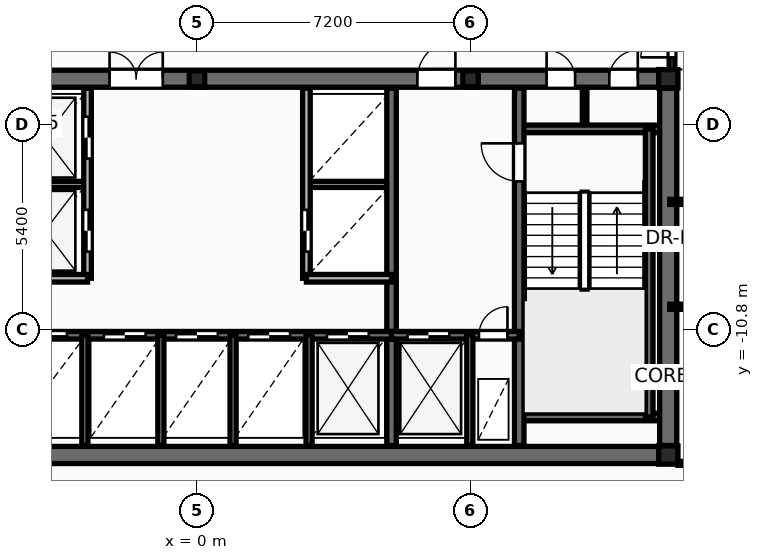
"""IFC4 building model, lengths in metres.
Left out: names, types, materials, properties, quantities, classifications, styles, units other than length and angle.
Written with IfcOpenShell. Run it as: python <this file> out.ifc"""

import sys

from ifc_helpers import new_model, si_unit, direction, frame, frame_2d, origin, origin_2d, place, context, subcontext, project, spatial, rectangle, i_section, extrude, element, fill, save


model = new_model("IFC4")
c1 = context("Model", 3, precision=1e-05, world=origin(), true_north=direction((0.0, 1.0)))
c2 = subcontext(c1, "Body", "Model", "MODEL_VIEW")
j1 = project(units=[si_unit("LENGTHUNIT", "METRE"), si_unit("PLANEANGLEUNIT", "RADIAN")], contexts=[c1])
p1 = place(None, origin())
s1 = spatial("IfcSite", under=j1, at=p1, CompositionType="ELEMENT")
p2 = place(p1, origin())
s2 = spatial("IfcBuilding", under=s1, at=p2, CompositionType="ELEMENT")
p3 = place(p2, frame((0.0, 0.0, 53.1)))
s3 = spatial("IfcBuildingStorey", under=s2, at=p3, CompositionType="ELEMENT", Elevation=53.1)
for number, where, z_axis, x_axis in (
    (1, (12.4, -14.1, 0.0), (0.0, 0.0, 1.0), (1.0, 0.0, 0.0)),
    (2, (12.4, -4.2, 0.0), (0.0, 0.0, 1.0), (1.0, 0.0, 0.0)),
):
    element("IfcColumn", number, at=place(p3, frame(where, z_axis=z_axis, x_axis=x_axis)), inside=s3, PredefinedType="COLUMN", context=c2, shape_type="SweptSolid", body=[
        extrude(i_section(OverallWidth=0.5, OverallDepth=0.482, WebThickness=0.04, FlangeThickness=0.045, at=origin_2d()), origin(), (0.0, 0.0, 1.0), 3.6),
    ])
for number, where, z_axis, x_axis in (
    (3, (0.0, -4.2, 0.0), (0.0, 0.0, 1.0), (1.0, 0.0, 0.0)),
    (4, (7.2, -4.2, 0.0), (0.0, 0.0, 1.0), (1.0, 0.0, 0.0)),
):
    element("IfcColumn", number, at=place(p3, frame(where, z_axis=z_axis, x_axis=x_axis)), inside=s3, PredefinedType="PILASTER", context=c2, shape_type="SweptSolid", body=[
        extrude(i_section(OverallWidth=0.405, OverallDepth=0.414, WebThickness=0.022, FlangeThickness=0.032, at=origin_2d()), origin(), (0.0, 0.0, 1.0), 3.6),
    ])
for number, where, z_axis, x_axis in (
    (5, (-5.12, -6.98, 0.0), (0.0, 0.0, 1.0), (1.0, 0.0, 0.0)),
    (6, (2.88, -6.98, 0.0), (0.0, 0.0, 1.0), (1.0, 0.0, 0.0)),
):
    element("IfcWall", number, at=place(p3, frame(where, z_axis=z_axis, x_axis=x_axis)), inside=s3, PredefinedType="PARTITIONING", context=c2, shape_type="SweptSolid", body=[
        extrude(rectangle(XDim=2.24, YDim=0.16, at=frame_2d((1.12, 0.0))), origin(), (0.0, 0.0, 1.0), 3.35),
    ])
p4 = place(p3, frame((10.2, -5.52, 0.0), z_axis=(0.0, 0.0, 1.0), x_axis=(0.0, 1.0, 0.0)))
e7 = element("IfcWall", 7, at=p4, inside=s3, PredefinedType="PARTITIONING", context=c2, shape_type="SweptSolid", body=[
    extrude(rectangle(XDim=1.12, YDim=0.12, at=frame_2d((0.56, 0.0))), origin(), (0.0, 0.0, 1.0), 3.35),
])
p5 = place(p3, frame((-12.65, -14.1, 0.0), z_axis=(0.0, 0.0, 1.0), x_axis=(1.0, 0.0, 0.0)))
e8 = element("IfcWall", 8, at=p5, inside=s3, PredefinedType="SHEAR", context=c2, shape_type="SweptSolid", body=[
    extrude(rectangle(XDim=25.3, YDim=0.45, at=frame_2d((12.65, 0.0))), origin(), (0.0, 0.0, 1.0), 3.6),
])
p6 = place(p3, frame((-12.65, -4.2, 0.0), z_axis=(0.0, 0.0, 1.0), x_axis=(1.0, 0.0, 0.0)))
e9 = element("IfcWall", 9, at=p6, inside=s3, PredefinedType="SHEAR", context=c2, shape_type="SweptSolid", body=[
    extrude(rectangle(XDim=25.3, YDim=0.45, at=frame_2d((12.65, 0.0))), origin(), (0.0, 0.0, 1.0), 3.6),
])
p7 = place(p6, frame((1.85, 0.0, 0.0)))
e10 = element("IfcOpeningElement", 10, at=p7, cuts=e9, PredefinedType="OPENING", context=c2, shape_type="SweptSolid", body=[
    extrude(rectangle(XDim=0.756, YDim=2.054, at=frame_2d((0.375, 1.027))), frame((0.0, 0.235, 0.0), z_axis=(0.0, -1.0, 0.0), x_axis=(1.0, 0.0, 0.0)), (0.0, 0.0, 1.0), 0.47),
])
p8 = place(p6, frame((21.85, 0.0, 0.0)))
e11 = element("IfcOpeningElement", 11, at=p8, cuts=e9, PredefinedType="OPENING", context=c2, shape_type="SweptSolid", body=[
    extrude(rectangle(XDim=0.756, YDim=2.054, at=frame_2d((0.375, 1.027))), frame((0.0, 0.235, 0.0), z_axis=(0.0, -1.0, 0.0), x_axis=(1.0, 0.0, 0.0)), (0.0, 0.0, 1.0), 0.47),
])
p9 = place(p6, frame((23.5, 0.0, 0.0)))
e12 = element("IfcOpeningElement", 12, at=p9, cuts=e9, PredefinedType="OPENING", context=c2, shape_type="SweptSolid", body=[
    extrude(rectangle(XDim=0.756, YDim=2.054, at=frame_2d((0.375, 1.027))), frame((0.0, 0.235, 0.0), z_axis=(0.0, -1.0, 0.0), x_axis=(1.0, 0.0, 0.0)), (0.0, 0.0, 1.0), 0.47),
])
p10 = place(p6, frame((5.85, 0.0, 0.0)))
e13 = element("IfcOpeningElement", 13, at=p10, cuts=e9, PredefinedType="OPENING", context=c2, shape_type="SweptSolid", body=[
    extrude(rectangle(XDim=1.006, YDim=2.104, at=frame_2d((0.5, 1.052))), frame((0.0, 0.235, 0.0), z_axis=(0.0, -1.0, 0.0), x_axis=(1.0, 0.0, 0.0)), (0.0, 0.0, 1.0), 0.47),
])
p11 = place(p6, frame((10.35, 0.0, 0.0)))
e14 = element("IfcOpeningElement", 14, at=p11, cuts=e9, PredefinedType="OPENING", context=c2, shape_type="SweptSolid", body=[
    extrude(rectangle(XDim=1.406, YDim=2.154, at=frame_2d((0.7, 1.077))), frame((0.0, 0.235, 0.0), z_axis=(0.0, -1.0, 0.0), x_axis=(1.0, 0.0, 0.0)), (0.0, 0.0, 1.0), 0.47),
])
p12 = place(p6, frame((18.45, 0.0, 0.0)))
e15 = element("IfcOpeningElement", 15, at=p12, cuts=e9, PredefinedType="OPENING", context=c2, shape_type="SweptSolid", body=[
    extrude(rectangle(XDim=1.006, YDim=2.104, at=frame_2d((0.5, 1.052))), frame((0.0, 0.235, 0.0), z_axis=(0.0, -1.0, 0.0), x_axis=(1.0, 0.0, 0.0)), (0.0, 0.0, 1.0), 0.47),
])
for number, where, z_axis, x_axis in (
    (16, (8.48, -5.52, 0.0), (0.0, 0.0, 1.0), (1.0, 0.0, 0.0)),
    (17, (8.48, -13.1, 0.0), (0.0, 0.0, 1.0), (1.0, 0.0, 0.0)),
):
    element("IfcWall", number, at=place(p3, frame(where, z_axis=z_axis, x_axis=x_axis)), inside=s3, PredefinedType="SOLIDWALL", context=c2, shape_type="SweptSolid", body=[
        extrude(rectangle(XDim=3.87, YDim=0.2, at=frame_2d((1.935, 0.0))), origin(), (0.0, 0.0, 1.0), 3.6),
    ])
p13 = place(p3, frame((11.9, -13.1, 0.0), z_axis=(0.0, 0.0, 1.0), x_axis=(0.0, 1.0, 0.0)))
e18 = element("IfcWall", 18, at=p13, inside=s3, PredefinedType="SOLIDWALL", context=c2, shape_type="SweptSolid", body=[
    extrude(rectangle(XDim=7.58, YDim=0.2, at=frame_2d((3.79, 0.0))), origin(), (0.0, 0.0, 1.0), 3.6),
])
p14 = place(p3, frame((8.48, -13.85, 0.0), z_axis=(0.0, 0.0, 1.0), x_axis=(0.0, 1.0, 0.0)))
e19 = element("IfcWall", 19, at=p14, inside=s3, PredefinedType="SHEAR", context=c2, shape_type="SweptSolid", body=[
    extrude(rectangle(XDim=9.4, YDim=0.25, at=frame_2d((4.7, 0.0))), origin(), (0.0, 0.0, 1.0), 3.6),
])
p15 = place(p14, frame((6.95, 0.0, 0.0)))
e20 = element("IfcOpeningElement", 20, at=p15, cuts=e19, PredefinedType="OPENING", context=c2, shape_type="SweptSolid", body=[
    extrude(rectangle(XDim=1.006, YDim=2.104, at=frame_2d((0.5, 1.052))), frame((0.0, 0.135, 0.0), z_axis=(0.0, -1.0, 0.0), x_axis=(1.0, 0.0, 0.0)), (0.0, 0.0, 1.0), 0.27),
])
p16 = place(p3, frame((5.12, -13.85, 0.0), z_axis=(0.0, 0.0, 1.0), x_axis=(0.0, 1.0, 0.0)))
e21 = element("IfcWall", 21, at=p16, inside=s3, PredefinedType="SHEAR", context=c2, shape_type="SweptSolid", body=[
    extrude(rectangle(XDim=9.4, YDim=0.25, at=frame_2d((4.7, 0.0))), origin(), (0.0, 0.0, 1.0), 3.6),
])
p17 = place(p3, frame((-5.12, -10.95, 0.0), z_axis=(0.0, 0.0, 1.0), x_axis=(1.0, 0.0, 0.0)))
e22 = element("IfcWall", 22, at=p17, inside=s3, PredefinedType="SOLIDWALL", context=c2, shape_type="SweptSolid", body=[
    extrude(rectangle(XDim=10.24, YDim=0.2, at=frame_2d((5.12, 0.0))), origin(), (0.0, 0.0, 1.0), 3.6),
])
p18 = place(p17, frame((0.6, 0.0, 0.0)))
e23 = element("IfcOpeningElement", 23, at=p18, cuts=e22, PredefinedType="OPENING", context=c2, shape_type="SweptSolid", body=[
    extrude(rectangle(XDim=1.106, YDim=2.104, at=frame_2d((0.55, 1.052))), frame((0.0, 0.11, 0.0), z_axis=(0.0, -1.0, 0.0), x_axis=(1.0, 0.0, 0.0)), (0.0, 0.0, 1.0), 0.22),
])
p19 = place(p17, frame((2.67, 0.0, 0.0)))
e24 = element("IfcOpeningElement", 24, at=p19, cuts=e22, PredefinedType="OPENING", context=c2, shape_type="SweptSolid", body=[
    extrude(rectangle(XDim=1.106, YDim=2.104, at=frame_2d((0.55, 1.052))), frame((0.0, 0.11, 0.0), z_axis=(0.0, -1.0, 0.0), x_axis=(1.0, 0.0, 0.0)), (0.0, 0.0, 1.0), 0.22),
])
p20 = place(p17, frame((4.57, 0.0, 0.0)))
e25 = element("IfcOpeningElement", 25, at=p20, cuts=e22, PredefinedType="OPENING", context=c2, shape_type="SweptSolid", body=[
    extrude(rectangle(XDim=1.106, YDim=2.104, at=frame_2d((0.55, 1.052))), frame((0.0, 0.11, 0.0), z_axis=(0.0, -1.0, 0.0), x_axis=(1.0, 0.0, 0.0)), (0.0, 0.0, 1.0), 0.22),
])
p21 = place(p17, frame((6.47, 0.0, 0.0)))
e26 = element("IfcOpeningElement", 26, at=p21, cuts=e22, PredefinedType="OPENING", context=c2, shape_type="SweptSolid", body=[
    extrude(rectangle(XDim=1.106, YDim=2.104, at=frame_2d((0.55, 1.052))), frame((0.0, 0.11, 0.0), z_axis=(0.0, -1.0, 0.0), x_axis=(1.0, 0.0, 0.0)), (0.0, 0.0, 1.0), 0.22),
])
p22 = place(p17, frame((8.54, 0.0, 0.0)))
e27 = element("IfcOpeningElement", 27, at=p22, cuts=e22, PredefinedType="OPENING", context=c2, shape_type="SweptSolid", body=[
    extrude(rectangle(XDim=1.106, YDim=2.104, at=frame_2d((0.55, 1.052))), frame((0.0, 0.11, 0.0), z_axis=(0.0, -1.0, 0.0), x_axis=(1.0, 0.0, 0.0)), (0.0, 0.0, 1.0), 0.22),
])
p23 = place(p3, frame((5.12, -10.95, 0.0), z_axis=(0.0, 0.0, 1.0), x_axis=(1.0, 0.0, 0.0)))
e28 = element("IfcWall", 28, at=p23, inside=s3, PredefinedType="SOLIDWALL", context=c2, shape_type="SweptSolid", body=[
    extrude(rectangle(XDim=3.36, YDim=0.2, at=frame_2d((1.68, 0.0))), origin(), (0.0, 0.0, 1.0), 3.6),
])
p24 = place(p23, frame((0.42, 0.0, 0.0)))
e29 = element("IfcOpeningElement", 29, at=p24, cuts=e28, PredefinedType="OPENING", context=c2, shape_type="SweptSolid", body=[
    extrude(rectangle(XDim=1.106, YDim=2.104, at=frame_2d((0.55, 1.052))), frame((0.0, 0.11, 0.0), z_axis=(0.0, -1.0, 0.0), x_axis=(1.0, 0.0, 0.0)), (0.0, 0.0, 1.0), 0.22),
])
p25 = place(p23, frame((2.3, 0.0, 0.0)))
e30 = element("IfcOpeningElement", 30, at=p25, cuts=e28, PredefinedType="OPENING", context=c2, shape_type="SweptSolid", body=[
    extrude(rectangle(XDim=0.756, YDim=2.054, at=frame_2d((0.375, 1.027))), frame((0.0, 0.11, 0.0), z_axis=(0.0, -1.0, 0.0), x_axis=(1.0, 0.0, 0.0)), (0.0, 0.0, 1.0), 0.22),
])
for number, where, z_axis, x_axis in (
    (31, (7.18, -13.85, 0.0), (0.0, 0.0, 1.0), (0.0, 1.0, 0.0)),
    (32, (-2.95, -13.85, 0.0), (0.0, 0.0, 1.0), (0.0, 1.0, 0.0)),
    (33, (2.95, -13.85, 0.0), (0.0, 0.0, 1.0), (0.0, 1.0, 0.0)),
):
    element("IfcWall", number, at=place(p3, frame(where, z_axis=z_axis, x_axis=x_axis)), inside=s3, PredefinedType="PARTITIONING", context=c2, shape_type="SweptSolid", body=[
        extrude(rectangle(XDim=2.9, YDim=0.16, at=frame_2d((1.45, 0.0))), origin(), (0.0, 0.0, 1.0), 2.375),
    ])
p26 = place(p3, frame((12.4, -13.85, 0.0), z_axis=(0.0, 0.0, 1.0), x_axis=(0.0, 1.0, 0.0)))
e34 = element("IfcWall", 34, at=p26, inside=s3, PredefinedType="SHEAR", context=c2, shape_type="SweptSolid", body=[
    extrude(rectangle(XDim=9.4, YDim=0.45, at=frame_2d((4.7, 0.0))), origin(), (0.0, 0.0, 1.0), 3.6),
])
p27 = place(p3, frame((-2.88, -9.45, 0.0), z_axis=(0.0, 0.0, 1.0), x_axis=(0.0, 1.0, 0.0)))
e35 = element("IfcWall", 35, at=p27, inside=s3, PredefinedType="SOLIDWALL", context=c2, shape_type="SweptSolid", body=[
    extrude(rectangle(XDim=5.0, YDim=0.2, at=frame_2d((2.5, 0.0))), origin(), (0.0, 0.0, 1.0), 3.35),
])
p28 = place(p27, frame((0.7, 0.0, 0.0)))
e36 = element("IfcOpeningElement", 36, at=p28, cuts=e35, PredefinedType="OPENING", context=c2, shape_type="SweptSolid", body=[
    extrude(rectangle(XDim=1.106, YDim=2.104, at=frame_2d((0.55, 1.052))), frame((0.0, 0.11, 0.0), z_axis=(0.0, -1.0, 0.0), x_axis=(1.0, 0.0, 0.0)), (0.0, 0.0, 1.0), 0.22),
])
p29 = place(p27, frame((3.15, 0.0, 0.0)))
e37 = element("IfcOpeningElement", 37, at=p29, cuts=e35, PredefinedType="OPENING", context=c2, shape_type="SweptSolid", body=[
    extrude(rectangle(XDim=1.106, YDim=2.104, at=frame_2d((0.55, 1.052))), frame((0.0, 0.11, 0.0), z_axis=(0.0, -1.0, 0.0), x_axis=(1.0, 0.0, 0.0)), (0.0, 0.0, 1.0), 0.22),
])
p30 = place(p3, frame((-5.12, -9.45, 0.0), z_axis=(0.0, 0.0, 1.0), x_axis=(1.0, 0.0, 0.0)))
e38 = element("IfcWall", 38, at=p30, inside=s3, PredefinedType="SOLIDWALL", context=c2, shape_type="SweptSolid", body=[
    extrude(rectangle(XDim=2.24, YDim=0.2, at=frame_2d((1.12, 0.0))), origin(), (0.0, 0.0, 1.0), 3.35),
])
p31 = place(p3, frame((2.88, -9.45, 0.0), z_axis=(0.0, 0.0, 1.0), x_axis=(0.0, 1.0, 0.0)))
e39 = element("IfcWall", 39, at=p31, inside=s3, PredefinedType="SOLIDWALL", context=c2, shape_type="SweptSolid", body=[
    extrude(rectangle(XDim=5.0, YDim=0.2, at=frame_2d((2.5, 0.0))), origin(), (0.0, 0.0, 1.0), 3.35),
])
p32 = place(p31, frame((0.7, 0.0, 0.0)))
e40 = element("IfcOpeningElement", 40, at=p32, cuts=e39, PredefinedType="OPENING", context=c2, shape_type="SweptSolid", body=[
    extrude(rectangle(XDim=1.106, YDim=2.104, at=frame_2d((0.55, 1.052))), frame((0.0, 0.11, 0.0), z_axis=(0.0, -1.0, 0.0), x_axis=(1.0, 0.0, 0.0)), (0.0, 0.0, 1.0), 0.22),
])
p33 = place(p3, frame((2.88, -9.45, 0.0), z_axis=(0.0, 0.0, 1.0), x_axis=(1.0, 0.0, 0.0)))
e41 = element("IfcWall", 41, at=p33, inside=s3, PredefinedType="SOLIDWALL", context=c2, shape_type="SweptSolid", body=[
    extrude(rectangle(XDim=2.24, YDim=0.2, at=frame_2d((1.12, 0.0))), origin(), (0.0, 0.0, 1.0), 3.35),
])
for number, where, z_axis, x_axis in (
    (42, (-0.95, -13.85, 0.0), (0.0, 0.0, 1.0), (0.0, 1.0, 0.0)),
    (43, (0.95, -13.85, 0.0), (0.0, 0.0, 1.0), (0.0, 1.0, 0.0)),
):
    element("IfcWall", number, at=place(p3, frame(where, z_axis=z_axis, x_axis=x_axis)), inside=s3, PredefinedType="PARTITIONING", context=c2, shape_type="SweptSolid", body=[
        extrude(rectangle(XDim=2.9, YDim=0.16, at=frame_2d((1.45, 0.0))), origin(), (0.0, 0.0, 1.0), 2.375),
    ])
p34 = place(p3, frame((12.66, -14.32, 0.0), z_axis=(0.0, 0.0, 1.0), x_axis=(1.0, 0.0, 0.0)))
e44 = element("IfcWall", 44, at=p34, inside=s3, PredefinedType="PARTITIONING", context=c2, shape_type="SweptSolid", body=[
    extrude(rectangle(XDim=6.184, YDim=0.105, at=frame_2d((3.092, 0.0))), origin(), (0.0, 0.0, 1.0), 2.713),
])
p35 = place(p34, frame((1.805, 0.0, 0.0)))
e45 = element("IfcOpeningElement", 45, at=p35, cuts=e44, PredefinedType="OPENING", context=c2, shape_type="SweptSolid", body=[
    extrude(rectangle(XDim=0.886, YDim=2.104, at=frame_2d((0.44, 1.052))), frame((0.0, 0.062, 0.0), z_axis=(0.0, -1.0, 0.0), x_axis=(1.0, 0.0, 0.0)), (0.0, 0.0, 1.0), 0.125),
])
p36 = place(p3, frame((12.44, -7.44, 0.0), z_axis=(0.0, 0.0, 1.0), x_axis=(1.0, 0.0, 0.0)))
e46 = element("IfcWall", 46, at=p36, inside=s3, PredefinedType="PARTITIONING", context=c2, shape_type="SweptSolid", body=[
    extrude(rectangle(XDim=2.638, YDim=0.135, at=frame_2d((1.319, 0.0))), origin(), (0.0, 0.0, 1.0), 2.713),
])
p37 = place(p36, frame((0.458, 0.0, 0.0)))
e47 = element("IfcOpeningElement", 47, at=p37, cuts=e46, PredefinedType="OPENING", context=c2, shape_type="SweptSolid", body=[
    extrude(rectangle(XDim=0.826, YDim=2.104, at=frame_2d((0.41, 1.052))), frame((0.0, 0.078, 0.0), z_axis=(0.0, -1.0, 0.0), x_axis=(1.0, 0.0, 0.0)), (0.0, 0.0, 1.0), 0.155),
])
p38 = place(p3, frame((12.44, -10.2, 0.0), z_axis=(0.0, 0.0, 1.0), x_axis=(1.0, 0.0, 0.0)))
e48 = element("IfcWall", 48, at=p38, inside=s3, PredefinedType="PARTITIONING", context=c2, shape_type="SweptSolid", body=[
    extrude(rectangle(XDim=2.72, YDim=0.135, at=frame_2d((1.36, 0.0))), origin(), (0.0, 0.0, 1.0), 2.713),
])
p39 = place(p3, frame((12.5, -4.24, 0.0), z_axis=(0.0, 0.0, 1.0), x_axis=(0.0, 1.0, 0.0)))
e49 = element("IfcWall", 49, at=p39, inside=s3, PredefinedType="PARTITIONING", context=c2, shape_type="SweptSolid", body=[
    extrude(rectangle(XDim=1.6, YDim=0.15, at=frame_2d((0.8, 0.0))), origin(), (0.0, 0.0, 1.0), 2.325),
])
p40 = place(p39, frame((0.602, 0.0, 0.0)))
e50 = element("IfcOpeningElement", 50, at=p40, cuts=e49, PredefinedType="OPENING", context=c2, shape_type="SweptSolid", body=[
    extrude(rectangle(XDim=0.826, YDim=2.104, at=frame_2d((0.41, 1.052))), frame((0.0, 0.085, 0.0), z_axis=(0.0, -1.0, 0.0), x_axis=(1.0, 0.0, 0.0)), (0.0, 0.0, 1.0), 0.17),
])
p41 = place(p28, origin())
e51 = element("IfcDoor", 51, at=p41, inside=s3, OperationType="DOUBLE_DOOR_SLIDING", PredefinedType="DOOR", context=c2, shape_type="SweptSolid", body=[
    extrude(rectangle(XDim=1.1, YDim=2.1, at=frame_2d((0.55, 1.05))), frame((0.0, 0.025, 0.0), z_axis=(0.0, -1.0, 0.0), x_axis=(1.0, 0.0, 0.0)), (0.0, 0.0, 1.0), 0.05),
])
fill(e36, e51)
p42 = place(p29, origin())
e52 = element("IfcDoor", 52, at=p42, inside=s3, OperationType="DOUBLE_DOOR_SLIDING", PredefinedType="DOOR", context=c2, shape_type="SweptSolid", body=[
    extrude(rectangle(XDim=1.1, YDim=2.1, at=frame_2d((0.55, 1.05))), frame((0.0, 0.025, 0.0), z_axis=(0.0, -1.0, 0.0), x_axis=(1.0, 0.0, 0.0)), (0.0, 0.0, 1.0), 0.05),
])
fill(e37, e52)
p43 = place(p32, origin())
e53 = element("IfcDoor", 53, at=p43, inside=s3, OperationType="DOUBLE_DOOR_SLIDING", PredefinedType="DOOR", context=c2, shape_type="SweptSolid", body=[
    extrude(rectangle(XDim=1.1, YDim=2.1, at=frame_2d((0.55, 1.05))), frame((0.0, 0.025, 0.0), z_axis=(0.0, -1.0, 0.0), x_axis=(1.0, 0.0, 0.0)), (0.0, 0.0, 1.0), 0.05),
])
fill(e40, e53)
p44 = place(p15, origin())
e54 = element("IfcDoor", 54, at=p44, inside=s3, OperationType="SINGLE_SWING_RIGHT", PredefinedType="DOOR", context=c2, shape_type="SweptSolid", body=[
    extrude(rectangle(XDim=1.0, YDim=2.1, at=frame_2d((0.5, 1.05))), frame((0.0, 0.025, 0.0), z_axis=(0.0, -1.0, 0.0), x_axis=(1.0, 0.0, 0.0)), (0.0, 0.0, 1.0), 0.05),
])
fill(e20, e54)
p45 = place(p24, origin())
e55 = element("IfcDoor", 55, at=p45, inside=s3, OperationType="DOUBLE_DOOR_SLIDING", PredefinedType="DOOR", context=c2, shape_type="SweptSolid", body=[
    extrude(rectangle(XDim=1.1, YDim=2.1, at=frame_2d((0.55, 1.05))), frame((0.0, 0.025, 0.0), z_axis=(0.0, -1.0, 0.0), x_axis=(1.0, 0.0, 0.0)), (0.0, 0.0, 1.0), 0.05),
])
fill(e29, e55)
p46 = place(p25, origin())
e56 = element("IfcDoor", 56, at=p46, inside=s3, OperationType="SINGLE_SWING_RIGHT", PredefinedType="DOOR", context=c2, shape_type="SweptSolid", body=[
    extrude(rectangle(XDim=0.75, YDim=2.05, at=frame_2d((0.375, 1.025))), frame((0.0, 0.025, 0.0), z_axis=(0.0, -1.0, 0.0), x_axis=(1.0, 0.0, 0.0)), (0.0, 0.0, 1.0), 0.05),
])
fill(e30, e56)
p47 = place(p18, origin())
e57 = element("IfcDoor", 57, at=p47, inside=s3, OperationType="DOUBLE_DOOR_SLIDING", PredefinedType="DOOR", context=c2, shape_type="SweptSolid", body=[
    extrude(rectangle(XDim=1.1, YDim=2.1, at=frame_2d((0.55, 1.05))), frame((0.0, 0.025, 0.0), z_axis=(0.0, -1.0, 0.0), x_axis=(1.0, 0.0, 0.0)), (0.0, 0.0, 1.0), 0.05),
])
fill(e23, e57)
p48 = place(p19, origin())
e58 = element("IfcDoor", 58, at=p48, inside=s3, OperationType="DOUBLE_DOOR_SLIDING", PredefinedType="DOOR", context=c2, shape_type="SweptSolid", body=[
    extrude(rectangle(XDim=1.1, YDim=2.1, at=frame_2d((0.55, 1.05))), frame((0.0, 0.025, 0.0), z_axis=(0.0, -1.0, 0.0), x_axis=(1.0, 0.0, 0.0)), (0.0, 0.0, 1.0), 0.05),
])
fill(e24, e58)
p49 = place(p20, origin())
e59 = element("IfcDoor", 59, at=p49, inside=s3, OperationType="DOUBLE_DOOR_SLIDING", PredefinedType="DOOR", context=c2, shape_type="SweptSolid", body=[
    extrude(rectangle(XDim=1.1, YDim=2.1, at=frame_2d((0.55, 1.05))), frame((0.0, 0.025, 0.0), z_axis=(0.0, -1.0, 0.0), x_axis=(1.0, 0.0, 0.0)), (0.0, 0.0, 1.0), 0.05),
])
fill(e25, e59)
p50 = place(p21, origin())
e60 = element("IfcDoor", 60, at=p50, inside=s3, OperationType="DOUBLE_DOOR_SLIDING", PredefinedType="DOOR", context=c2, shape_type="SweptSolid", body=[
    extrude(rectangle(XDim=1.1, YDim=2.1, at=frame_2d((0.55, 1.05))), frame((0.0, 0.025, 0.0), z_axis=(0.0, -1.0, 0.0), x_axis=(1.0, 0.0, 0.0)), (0.0, 0.0, 1.0), 0.05),
])
fill(e26, e60)
p51 = place(p22, origin())
e61 = element("IfcDoor", 61, at=p51, inside=s3, OperationType="DOUBLE_DOOR_SLIDING", PredefinedType="DOOR", context=c2, shape_type="SweptSolid", body=[
    extrude(rectangle(XDim=1.1, YDim=2.1, at=frame_2d((0.55, 1.05))), frame((0.0, 0.025, 0.0), z_axis=(0.0, -1.0, 0.0), x_axis=(1.0, 0.0, 0.0)), (0.0, 0.0, 1.0), 0.05),
])
fill(e27, e61)
p52 = place(p8, origin())
e62 = element("IfcDoor", 62, at=p52, inside=s3, OperationType="SINGLE_SWING_LEFT", PredefinedType="DOOR", context=c2, shape_type="SweptSolid", body=[
    extrude(rectangle(XDim=0.75, YDim=2.05, at=frame_2d((0.375, 1.025))), frame((0.0, 0.025, 0.0), z_axis=(0.0, -1.0, 0.0), x_axis=(1.0, 0.0, 0.0)), (0.0, 0.0, 1.0), 0.05),
])
fill(e11, e62)
p53 = place(p9, origin())
e63 = element("IfcDoor", 63, at=p53, inside=s3, OperationType="SINGLE_SWING_RIGHT", PredefinedType="DOOR", context=c2, shape_type="SweptSolid", body=[
    extrude(rectangle(XDim=0.75, YDim=2.05, at=frame_2d((0.375, 1.025))), frame((0.0, 0.025, 0.0), z_axis=(0.0, -1.0, 0.0), x_axis=(1.0, 0.0, 0.0)), (0.0, 0.0, 1.0), 0.05),
])
fill(e12, e63)
p54 = place(p11, origin())
e64 = element("IfcDoor", 64, at=p54, inside=s3, OperationType="DOUBLE_DOOR_SINGLE_SWING", PredefinedType="DOOR", context=c2, shape_type="SweptSolid", body=[
    extrude(rectangle(XDim=1.4, YDim=2.15, at=frame_2d((0.7, 1.075))), frame((0.0, 0.025, 0.0), z_axis=(0.0, -1.0, 0.0), x_axis=(1.0, 0.0, 0.0)), (0.0, 0.0, 1.0), 0.05),
])
fill(e14, e64)
p55 = place(p12, origin())
e65 = element("IfcDoor", 65, at=p55, inside=s3, OperationType="SINGLE_SWING_RIGHT", PredefinedType="DOOR", context=c2, shape_type="SweptSolid", body=[
    extrude(rectangle(XDim=1.0, YDim=2.1, at=frame_2d((0.5, 1.05))), frame((0.0, 0.025, 0.0), z_axis=(0.0, -1.0, 0.0), x_axis=(1.0, 0.0, 0.0)), (0.0, 0.0, 1.0), 0.05),
])
fill(e15, e65)
p56 = place(p40, origin())
e66 = element("IfcDoor", 66, at=p56, inside=s3, OperationType="SINGLE_SWING_LEFT", PredefinedType="DOOR", context=c2, shape_type="SweptSolid", body=[
    extrude(rectangle(XDim=0.82, YDim=2.1, at=frame_2d((0.41, 1.05))), frame((0.0, 0.025, 0.0), z_axis=(0.0, -1.0, 0.0), x_axis=(1.0, 0.0, 0.0)), (0.0, 0.0, 1.0), 0.05),
])
fill(e50, e66)
save(model, sys.argv[1])
